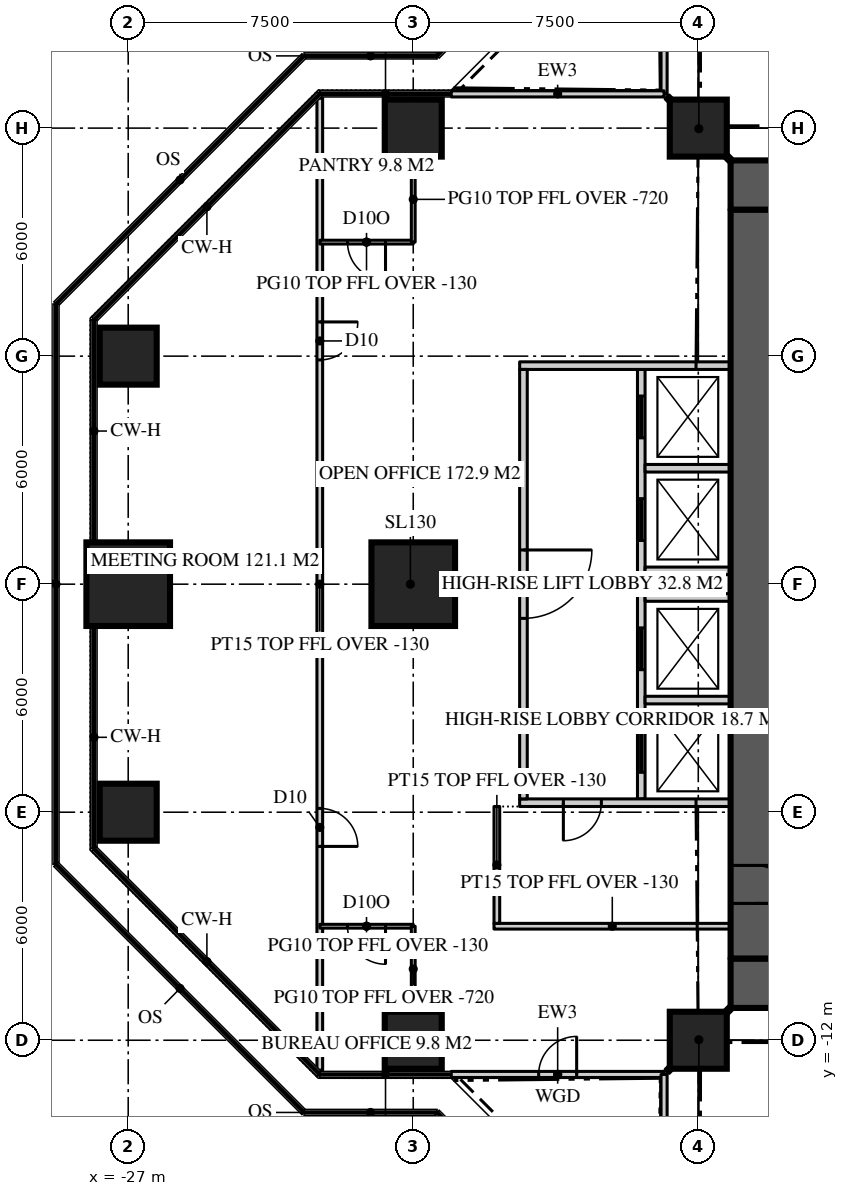
"""IFC4 building model, lengths in metres.
Left out: names, types, materials, properties, quantities, classifications, styles, units other than length and angle.
Written with IfcOpenShell. Run it as: python <this file> out.ifc"""

import sys

from ifc_helpers import new_model, si_unit, direction, frame, frame_2d, origin, origin_2d, place, context, subcontext, project, spatial, rectangle, extrude, element, fill, save


model = new_model("IFC4")
c1 = context("Model", 3, precision=1e-05, world=origin(), true_north=direction((0.0, 1.0)))
c2 = subcontext(c1, "Body", "Model", "MODEL_VIEW")
j1 = project(units=[si_unit("LENGTHUNIT", "METRE"), si_unit("PLANEANGLEUNIT", "RADIAN")], contexts=[c1])
p1 = place(None, origin())
s1 = spatial("IfcSite", under=j1, at=p1, CompositionType="ELEMENT")
p2 = place(p1, origin())
s2 = spatial("IfcBuilding", under=s1, at=p2, CompositionType="ELEMENT")
p3 = place(p2, frame((0.0, 0.0, 243.9)))
s3 = spatial("IfcBuildingStorey", under=s2, at=p3, CompositionType="ELEMENT", Elevation=243.9)
p4 = place(p3, frame((-11.15, 10.5, 0.0), z_axis=(0.0, 0.0, 1.0), x_axis=(1.0, 0.0, 0.0)))
e1 = element("IfcWall", 1, at=p4, inside=s3, PredefinedType="SHEAR", context=c2, shape_type="SweptSolid", body=[
    extrude(rectangle(XDim=22.3, YDim=1.3, at=frame_2d((11.15, 0.0))), origin(), (0.0, 0.0, 1.0), 3.9),
])
p5 = place(p4, frame((4.25, 0.0, 0.0)))
e2 = element("IfcOpeningElement", 2, at=p5, cuts=e1, PredefinedType="OPENING", context=c2, shape_type="SweptSolid", body=[
    extrude(rectangle(XDim=1.8, YDim=2.2, at=frame_2d((0.9, 1.1))), frame((0.0, 0.66, 0.0), z_axis=(0.0, -1.0, 0.0), x_axis=(1.0, 0.0, 0.0)), (0.0, 0.0, 1.0), 1.32),
])
p6 = place(p4, frame((16.25, 0.0, 0.0)))
e3 = element("IfcOpeningElement", 3, at=p6, cuts=e1, PredefinedType="OPENING", context=c2, shape_type="SweptSolid", body=[
    extrude(rectangle(XDim=1.8, YDim=2.2, at=frame_2d((0.9, 1.1))), frame((0.0, 0.66, 0.0), z_axis=(0.0, -1.0, 0.0), x_axis=(1.0, 0.0, 0.0)), (0.0, 0.0, 1.0), 1.32),
])
p7 = place(p3, frame((11.15, -10.5, 0.0), z_axis=(0.0, 0.0, 1.0), x_axis=(-1.0, 0.0, 0.0)))
e4 = element("IfcWall", 4, at=p7, inside=s3, PredefinedType="SHEAR", context=c2, shape_type="SweptSolid", body=[
    extrude(rectangle(XDim=22.3, YDim=1.3, at=frame_2d((11.15, 0.0))), origin(), (0.0, 0.0, 1.0), 3.9),
])
p8 = place(p7, frame((16.25, 0.0, 0.0)))
e5 = element("IfcOpeningElement", 5, at=p8, cuts=e4, PredefinedType="OPENING", context=c2, shape_type="SweptSolid", body=[
    extrude(rectangle(XDim=1.8, YDim=2.2, at=frame_2d((0.9, 1.1))), frame((0.0, 0.66, 0.0), z_axis=(0.0, -1.0, 0.0), x_axis=(1.0, 0.0, 0.0)), (0.0, 0.0, 1.0), 1.32),
])
p9 = place(p7, frame((4.25, 0.0, 0.0)))
e6 = element("IfcOpeningElement", 6, at=p9, cuts=e4, PredefinedType="OPENING", context=c2, shape_type="SweptSolid", body=[
    extrude(rectangle(XDim=1.8, YDim=2.2, at=frame_2d((0.9, 1.1))), frame((0.0, 0.66, 0.0), z_axis=(0.0, -1.0, 0.0), x_axis=(1.0, 0.0, 0.0)), (0.0, 0.0, 1.0), 1.32),
])
p10 = place(p3, frame((-10.5, 9.85, 0.0), z_axis=(0.0, 0.0, 1.0), x_axis=(0.0, -1.0, 0.0)))
e7 = element("IfcWall", 7, at=p10, inside=s3, PredefinedType="SHEAR", context=c2, shape_type="SweptSolid", body=[
    extrude(rectangle(XDim=19.7, YDim=1.3, at=frame_2d((9.85, 0.0))), origin(), (0.0, 0.0, 1.0), 3.9),
])
p11 = place(p10, frame((17.25, 0.0, 0.0)))
e8 = element("IfcOpeningElement", 8, at=p11, cuts=e7, PredefinedType="OPENING", context=c2, shape_type="SweptSolid", body=[
    extrude(rectangle(XDim=1.0, YDim=2.2, at=frame_2d((0.5, 1.1))), frame((0.0, 0.66, 0.0), z_axis=(0.0, -1.0, 0.0), x_axis=(1.0, 0.0, 0.0)), (0.0, 0.0, 1.0), 1.32),
])
for number, where, z_axis, x_axis in (
    (9, (-19.5, -12.0, 0.0), (0.0, 0.0, 1.0), (1.0, 0.0, 0.0)),
    (10, (-12.0, -12.0, 0.0), (0.0, 0.0, 1.0), (1.0, 0.0, 0.0)),
    (11, (-27.0, -6.0, 0.0), (0.0, 0.0, 1.0), (1.0, 0.0, 0.0)),
):
    element("IfcColumn", number, at=place(p3, frame(where, z_axis=z_axis, x_axis=x_axis)), inside=s3, PredefinedType="COLUMN", context=c2, shape_type="SweptSolid", body=[
        extrude(rectangle(XDim=1.5, YDim=1.5, at=origin_2d()), origin(), (0.0, 0.0, 1.0), 3.9),
    ])
for number, where, z_axis, x_axis in (
    (12, (-27.0, 0.0, 0.0), (0.0, 0.0, 1.0), (1.0, 0.0, 0.0)),
    (13, (-19.5, 0.0, 0.0), (0.0, 0.0, 1.0), (1.0, 0.0, 0.0)),
):
    element("IfcColumn", number, at=place(p3, frame(where, z_axis=z_axis, x_axis=x_axis)), inside=s3, PredefinedType="COLUMN", context=c2, shape_type="SweptSolid", body=[
        extrude(rectangle(XDim=2.2, YDim=2.2, at=origin_2d()), origin(), (0.0, 0.0, 1.0), 3.9),
    ])
for number, where, z_axis, x_axis in (
    (14, (-27.0, 6.0, 0.0), (0.0, 0.0, 1.0), (1.0, 0.0, 0.0)),
    (15, (-19.5, 12.0, 0.0), (0.0, 0.0, 1.0), (1.0, 0.0, 0.0)),
    (16, (-12.0, 12.0, 0.0), (0.0, 0.0, 1.0), (1.0, 0.0, 0.0)),
):
    element("IfcColumn", number, at=place(p3, frame(where, z_axis=z_axis, x_axis=x_axis)), inside=s3, PredefinedType="COLUMN", context=c2, shape_type="SweptSolid", body=[
        extrude(rectangle(XDim=1.5, YDim=1.5, at=origin_2d()), origin(), (0.0, 0.0, 1.0), 3.9),
    ])
p12 = place(p3, frame((-12.9, 18.5, 0.0), z_axis=(0.0, 0.0, 1.0), x_axis=(0.0, -1.0, 0.0)))
e17 = element("IfcWall", 17, at=p12, inside=s3, PredefinedType="SOLIDWALL", context=c2, shape_type="SweptSolid", body=[
    extrude(rectangle(XDim=5.6, YDim=0.16, at=frame_2d((2.8, 0.0))), origin(), (0.0, 0.0, 1.0), 3.77),
])
p13 = place(p12, frame((2.3, 0.0, 0.0)))
e18 = element("IfcOpeningElement", 18, at=p13, cuts=e17, PredefinedType="OPENING", context=c2, shape_type="SweptSolid", body=[
    extrude(rectangle(XDim=1.0, YDim=2.2, at=frame_2d((0.5, 1.1))), frame((0.0, 0.09, 0.0), z_axis=(0.0, -1.0, 0.0), x_axis=(1.0, 0.0, 0.0)), (0.0, 0.0, 1.0), 0.18),
])
p14 = place(p3, frame((-12.9, 12.9, 0.0), z_axis=(0.0, 0.0, 1.0), x_axis=(-1.0, 0.0, 0.0)))
e19 = element("IfcWall", 19, at=p14, inside=s3, PredefinedType="SOLIDWALL", context=c2, shape_type="SweptSolid", body=[
    extrude(rectangle(XDim=5.6, YDim=0.16, at=frame_2d((2.8, 0.0))), origin(), (0.0, 0.0, 1.0), 3.77),
])
p15 = place(p3, frame((-18.5, -12.9, 0.0), z_axis=(0.0, 0.0, 1.0), x_axis=(1.0, 0.0, 0.0)))
e20 = element("IfcWall", 20, at=p15, inside=s3, PredefinedType="SOLIDWALL", context=c2, shape_type="SweptSolid", body=[
    extrude(rectangle(XDim=5.6, YDim=0.16, at=frame_2d((2.8, 0.0))), origin(), (0.0, 0.0, 1.0), 3.77),
])
p16 = place(p15, frame((2.3, 0.0, 0.0)))
e21 = element("IfcOpeningElement", 21, at=p16, cuts=e20, PredefinedType="OPENING", context=c2, shape_type="SweptSolid", body=[
    extrude(rectangle(XDim=1.0, YDim=2.2, at=frame_2d((0.5, 1.1))), frame((0.0, 0.09, 0.0), z_axis=(0.0, -1.0, 0.0), x_axis=(1.0, 0.0, 0.0)), (0.0, 0.0, 1.0), 0.18),
])
p17 = place(p3, frame((-12.9, -12.9, 0.0), z_axis=(0.0, 0.0, 1.0), x_axis=(0.0, -1.0, 0.0)))
e22 = element("IfcWall", 22, at=p17, inside=s3, PredefinedType="SOLIDWALL", context=c2, shape_type="SweptSolid", body=[
    extrude(rectangle(XDim=5.6, YDim=0.16, at=frame_2d((2.8, 0.0))), origin(), (0.0, 0.0, 1.0), 3.77),
])
p18 = place(p3, frame((-21.959, 12.786, 0.0), z_axis=(0.0, 0.0, 1.0), x_axis=(0.0, -1.0, 0.0)))
e23 = element("IfcWall", 23, at=p18, inside=s3, PredefinedType="PARTITIONING", context=c2, shape_type="SweptSolid", body=[
    extrude(rectangle(XDim=25.573, YDim=0.15, at=frame_2d((12.786, 0.0))), origin(), (0.0, 0.0, 1.0), 3.77),
])
p19 = place(p18, frame((18.687, 0.0, 0.0)))
e24 = element("IfcOpeningElement", 24, at=p19, cuts=e23, PredefinedType="OPENING", context=c2, shape_type="SweptSolid", body=[
    extrude(rectangle(XDim=1.0, YDim=2.2, at=frame_2d((0.5, 1.1))), frame((0.0, 0.085, 0.0), z_axis=(0.0, -1.0, 0.0), x_axis=(1.0, 0.0, 0.0)), (0.0, 0.0, 1.0), 0.17),
])
p20 = place(p18, frame((5.886, 0.0, 0.0)))
e25 = element("IfcOpeningElement", 25, at=p20, cuts=e23, PredefinedType="OPENING", context=c2, shape_type="SweptSolid", body=[
    extrude(rectangle(XDim=1.0, YDim=2.2, at=frame_2d((0.5, 1.1))), frame((0.0, 0.085, 0.0), z_axis=(0.0, -1.0, 0.0), x_axis=(1.0, 0.0, 0.0)), (0.0, 0.0, 1.0), 0.17),
])
p21 = place(p3, frame((-19.5, -9.0, 0.0), z_axis=(0.0, 0.0, 1.0), x_axis=(-1.0, 0.0, 0.0)))
e26 = element("IfcWall", 26, at=p21, inside=s3, PredefinedType="PARTITIONING", context=c2, shape_type="SweptSolid", body=[
    extrude(rectangle(XDim=2.459, YDim=0.1, at=frame_2d((1.229, 0.0))), origin(), (0.0, 0.0, 1.0), 3.77),
])
p22 = place(p21, frame((0.729, 0.0, 0.0)))
e27 = element("IfcOpeningElement", 27, at=p22, cuts=e26, PredefinedType="OPENING", context=c2, shape_type="SweptSolid", body=[
    extrude(rectangle(XDim=1.0, YDim=2.2, at=frame_2d((0.5, 1.1))), frame((0.0, 0.06, 0.0), z_axis=(0.0, -1.0, 0.0), x_axis=(1.0, 0.0, 0.0)), (0.0, 0.0, 1.0), 0.12),
])
p23 = place(p3, frame((-19.5, -9.0, 0.0), z_axis=(0.0, 0.0, 1.0), x_axis=(0.0, -1.0, 0.0)))
e28 = element("IfcWall", 28, at=p23, inside=s3, PredefinedType="PARTITIONING", context=c2, shape_type="SweptSolid", body=[
    extrude(rectangle(XDim=2.25, YDim=0.1, at=frame_2d((1.125, 0.0))), origin(), (0.0, 0.0, 1.0), 3.18),
])
p24 = place(p3, frame((-19.5, 9.0, 0.0), z_axis=(0.0, 0.0, 1.0), x_axis=(-1.0, 0.0, 0.0)))
e29 = element("IfcWall", 29, at=p24, inside=s3, PredefinedType="PARTITIONING", context=c2, shape_type="SweptSolid", body=[
    extrude(rectangle(XDim=2.459, YDim=0.1, at=frame_2d((1.229, 0.0))), origin(), (0.0, 0.0, 1.0), 3.77),
])
p25 = place(p24, frame((0.729, 0.0, 0.0)))
e30 = element("IfcOpeningElement", 30, at=p25, cuts=e29, PredefinedType="OPENING", context=c2, shape_type="SweptSolid", body=[
    extrude(rectangle(XDim=1.0, YDim=2.2, at=frame_2d((0.5, 1.1))), frame((0.0, 0.06, 0.0), z_axis=(0.0, -1.0, 0.0), x_axis=(1.0, 0.0, 0.0)), (0.0, 0.0, 1.0), 0.12),
])
p26 = place(p3, frame((-19.5, 9.0, 0.0), z_axis=(0.0, 0.0, 1.0), x_axis=(0.0, 1.0, 0.0)))
e31 = element("IfcWall", 31, at=p26, inside=s3, PredefinedType="PARTITIONING", context=c2, shape_type="SweptSolid", body=[
    extrude(rectangle(XDim=2.25, YDim=0.1, at=frame_2d((1.125, 0.0))), origin(), (0.0, 0.0, 1.0), 3.18),
])
p27 = place(p3, frame((-13.5, 5.65, 0.0), z_axis=(0.0, 0.0, 1.0), x_axis=(0.0, -1.0, 0.0)))
e32 = element("IfcWall", 32, at=p27, inside=s3, PredefinedType="SOLIDWALL", context=c2, shape_type="SweptSolid", body=[
    extrude(rectangle(XDim=11.3, YDim=0.2, at=frame_2d((5.65, 0.0))), origin(), (0.0, 0.0, 1.0), 3.7),
])
p28 = place(p27, frame((0.7, 0.0, 0.0)))
e33 = element("IfcOpeningElement", 33, at=p28, cuts=e32, PredefinedType="OPENING", context=c2, shape_type="SweptSolid", body=[
    extrude(rectangle(XDim=1.1, YDim=2.2, at=frame_2d((0.55, 1.1))), frame((0.0, 0.11, 0.0), z_axis=(0.0, -1.0, 0.0), x_axis=(1.0, 0.0, 0.0)), (0.0, 0.0, 1.0), 0.22),
])
p29 = place(p27, frame((3.4, 0.0, 0.0)))
e34 = element("IfcOpeningElement", 34, at=p29, cuts=e32, PredefinedType="OPENING", context=c2, shape_type="SweptSolid", body=[
    extrude(rectangle(XDim=1.1, YDim=2.2, at=frame_2d((0.55, 1.1))), frame((0.0, 0.11, 0.0), z_axis=(0.0, -1.0, 0.0), x_axis=(1.0, 0.0, 0.0)), (0.0, 0.0, 1.0), 0.22),
])
p30 = place(p27, frame((6.8, 0.0, 0.0)))
e35 = element("IfcOpeningElement", 35, at=p30, cuts=e32, PredefinedType="OPENING", context=c2, shape_type="SweptSolid", body=[
    extrude(rectangle(XDim=1.1, YDim=2.2, at=frame_2d((0.55, 1.1))), frame((0.0, 0.11, 0.0), z_axis=(0.0, -1.0, 0.0), x_axis=(1.0, 0.0, 0.0)), (0.0, 0.0, 1.0), 0.22),
])
p31 = place(p27, frame((9.5, 0.0, 0.0)))
e36 = element("IfcOpeningElement", 36, at=p31, cuts=e32, PredefinedType="OPENING", context=c2, shape_type="SweptSolid", body=[
    extrude(rectangle(XDim=1.1, YDim=2.2, at=frame_2d((0.55, 1.1))), frame((0.0, 0.11, 0.0), z_axis=(0.0, -1.0, 0.0), x_axis=(1.0, 0.0, 0.0)), (0.0, 0.0, 1.0), 0.22),
])
p32 = place(p3, frame((-11.15, 5.75, 0.0), z_axis=(0.0, 0.0, 1.0), x_axis=(-1.0, 0.0, 0.0)))
e37 = element("IfcWall", 37, at=p32, inside=s3, PredefinedType="SOLIDWALL", context=c2, shape_type="SweptSolid", body=[
    extrude(rectangle(XDim=5.55, YDim=0.2, at=frame_2d((2.775, 0.0))), origin(), (0.0, 0.0, 1.0), 3.7),
])
p33 = place(p3, frame((-11.15, -5.75, 0.0), z_axis=(0.0, 0.0, 1.0), x_axis=(-1.0, 0.0, 0.0)))
e38 = element("IfcWall", 38, at=p33, inside=s3, PredefinedType="SOLIDWALL", context=c2, shape_type="SweptSolid", body=[
    extrude(rectangle(XDim=5.55, YDim=0.2, at=frame_2d((2.775, 0.0))), origin(), (0.0, 0.0, 1.0), 3.7),
])
p34 = place(p33, frame((3.4, 0.0, 0.0)))
e39 = element("IfcOpeningElement", 39, at=p34, cuts=e38, PredefinedType="OPENING", context=c2, shape_type="SweptSolid", body=[
    extrude(rectangle(XDim=1.0, YDim=2.2, at=frame_2d((0.5, 1.1))), frame((0.0, 0.11, 0.0), z_axis=(0.0, -1.0, 0.0), x_axis=(1.0, 0.0, 0.0)), (0.0, 0.0, 1.0), 0.22),
])
for number, where, z_axis, x_axis in (
    (40, (-11.15, 3.05, 0.0), (0.0, 0.0, 1.0), (-1.0, 0.0, 0.0)),
    (41, (-11.15, 0.35, 0.0), (0.0, 0.0, 1.0), (-1.0, 0.0, 0.0)),
    (42, (-11.15, -0.35, 0.0), (0.0, 0.0, 1.0), (-1.0, 0.0, 0.0)),
    (43, (-11.15, -3.05, 0.0), (0.0, 0.0, 1.0), (-1.0, 0.0, 0.0)),
):
    element("IfcWall", number, at=place(p3, frame(where, z_axis=z_axis, x_axis=x_axis)), inside=s3, PredefinedType="SOLIDWALL", context=c2, shape_type="SweptSolid", body=[
        extrude(rectangle(XDim=2.25, YDim=0.2, at=frame_2d((1.125, 0.0))), origin(), (0.0, 0.0, 1.0), 3.7),
    ])
p35 = place(p3, frame((-16.6, 5.65, 0.0), z_axis=(0.0, 0.0, 1.0), x_axis=(0.0, -1.0, 0.0)))
e44 = element("IfcWall", 44, at=p35, inside=s3, PredefinedType="SOLIDWALL", context=c2, shape_type="SweptSolid", body=[
    extrude(rectangle(XDim=11.3, YDim=0.2, at=frame_2d((5.65, 0.0))), origin(), (0.0, 0.0, 1.0), 3.18),
])
p36 = place(p35, frame((4.75, 0.0, 0.0)))
e45 = element("IfcOpeningElement", 45, at=p36, cuts=e44, PredefinedType="OPENING", context=c2, shape_type="SweptSolid", body=[
    extrude(rectangle(XDim=1.8, YDim=2.2, at=frame_2d((0.9, 1.1))), frame((0.0, 0.11, 0.0), z_axis=(0.0, -1.0, 0.0), x_axis=(1.0, 0.0, 0.0)), (0.0, 0.0, 1.0), 0.22),
])
for number, where, z_axis, x_axis in (
    (46, (-11.15, 11.15, 0.0), (0.0, 0.0, 1.0), (-0.707, 0.707, 0.0)),
    (47, (-11.15, -11.15, 0.0), (0.0, 0.0, 1.0), (-0.707, -0.707, 0.0)),
):
    element("IfcWall", number, at=place(p3, frame(where, z_axis=z_axis, x_axis=x_axis)), inside=s3, PredefinedType="PARTITIONING", context=c2, shape_type="SweptSolid", body=[
        extrude(rectangle(XDim=2.362, YDim=0.15, at=frame_2d((1.181, 0.0))), origin(), (0.0, 0.0, 1.0), 3.22),
    ])
p37 = place(p3, frame((-11.15, -9.0, 0.0), z_axis=(0.0, 0.0, 1.0), x_axis=(-1.0, 0.0, 0.0)))
e48 = element("IfcWall", 48, at=p37, inside=s3, PredefinedType="PARTITIONING", context=c2, shape_type="SweptSolid", body=[
    extrude(rectangle(XDim=6.225, YDim=0.15, at=frame_2d((3.113, 0.0))), origin(), (0.0, 0.0, 1.0), 3.77),
])
p38 = place(p3, frame((-17.3, -5.85, 0.0), z_axis=(0.0, 0.0, 1.0), x_axis=(0.0, -1.0, 0.0)))
e49 = element("IfcWall", 49, at=p38, inside=s3, PredefinedType="PARTITIONING", context=c2, shape_type="SweptSolid", body=[
    extrude(rectangle(XDim=3.075, YDim=0.15, at=frame_2d((1.538, 0.0))), origin(), (0.0, 0.0, 1.0), 3.77),
])
p39 = place(p16, origin())
e50 = element("IfcDoor", 50, at=p39, inside=s3, OperationType="SINGLE_SWING_RIGHT", PredefinedType="DOOR", context=c2, shape_type="SweptSolid", body=[
    extrude(rectangle(XDim=1.0, YDim=2.2, at=frame_2d((0.5, 1.1))), frame((0.0, 0.025, 0.0), z_axis=(0.0, -1.0, 0.0), x_axis=(1.0, 0.0, 0.0)), (0.0, 0.0, 1.0), 0.05),
])
fill(e21, e50)
p40 = place(p11, origin())
e51 = element("IfcDoor", 51, at=p40, inside=s3, OperationType="SINGLE_SWING_RIGHT", PredefinedType="DOOR", context=c2, shape_type="SweptSolid", body=[
    extrude(rectangle(XDim=1.0, YDim=2.2, at=frame_2d((0.5, 1.1))), frame((0.0, 0.025, 0.0), z_axis=(0.0, -1.0, 0.0), x_axis=(1.0, 0.0, 0.0)), (0.0, 0.0, 1.0), 0.05),
])
fill(e8, e51)
p41 = place(p19, origin())
e52 = element("IfcDoor", 52, at=p41, inside=s3, OperationType="SINGLE_SWING_RIGHT", PredefinedType="DOOR", context=c2, shape_type="SweptSolid", body=[
    extrude(rectangle(XDim=1.0, YDim=2.2, at=frame_2d((0.5, 1.1))), frame((0.0, 0.025, 0.0), z_axis=(0.0, -1.0, 0.0), x_axis=(1.0, 0.0, 0.0)), (0.0, 0.0, 1.0), 0.05),
])
fill(e24, e52)
p42 = place(p20, origin())
e53 = element("IfcDoor", 53, at=p42, inside=s3, OperationType="SINGLE_SWING_LEFT", PredefinedType="DOOR", context=c2, shape_type="SweptSolid", body=[
    extrude(rectangle(XDim=1.0, YDim=2.2, at=frame_2d((0.5, 1.1))), frame((0.0, 0.025, 0.0), z_axis=(0.0, -1.0, 0.0), x_axis=(1.0, 0.0, 0.0)), (0.0, 0.0, 1.0), 0.05),
])
fill(e25, e53)
p43 = place(p22, origin())
e54 = element("IfcDoor", 54, at=p43, inside=s3, OperationType="SINGLE_SWING_LEFT", PredefinedType="DOOR", context=c2, shape_type="SweptSolid", body=[
    extrude(rectangle(XDim=1.0, YDim=2.2, at=frame_2d((0.5, 1.1))), frame((0.0, 0.025, 0.0), z_axis=(0.0, -1.0, 0.0), x_axis=(1.0, 0.0, 0.0)), (0.0, 0.0, 1.0), 0.05),
])
fill(e27, e54)
p44 = place(p25, origin())
e55 = element("IfcDoor", 55, at=p44, inside=s3, OperationType="SINGLE_SWING_LEFT", PredefinedType="DOOR", context=c2, shape_type="SweptSolid", body=[
    extrude(rectangle(XDim=1.0, YDim=2.2, at=frame_2d((0.5, 1.1))), frame((0.0, 0.025, 0.0), z_axis=(0.0, -1.0, 0.0), x_axis=(1.0, 0.0, 0.0)), (0.0, 0.0, 1.0), 0.05),
])
fill(e30, e55)
p45 = place(p36, origin())
e56 = element("IfcDoor", 56, at=p45, inside=s3, OperationType="DOUBLE_DOOR_DOUBLE_SWING", PredefinedType="DOOR", context=c2, shape_type="SweptSolid", body=[
    extrude(rectangle(XDim=1.8, YDim=2.2, at=frame_2d((0.9, 1.1))), frame((0.0, 0.025, 0.0), z_axis=(0.0, -1.0, 0.0), x_axis=(1.0, 0.0, 0.0)), (0.0, 0.0, 1.0), 0.05),
])
fill(e45, e56)
p46 = place(p28, origin())
e57 = element("IfcDoor", 57, at=p46, inside=s3, OperationType="SLIDING_TO_LEFT", PredefinedType="DOOR", context=c2, shape_type="SweptSolid", body=[
    extrude(rectangle(XDim=1.1, YDim=2.2, at=frame_2d((0.55, 1.1))), frame((0.0, 0.025, 0.0), z_axis=(0.0, -1.0, 0.0), x_axis=(1.0, 0.0, 0.0)), (0.0, 0.0, 1.0), 0.05),
])
fill(e33, e57)
p47 = place(p29, origin())
e58 = element("IfcDoor", 58, at=p47, inside=s3, OperationType="SLIDING_TO_LEFT", PredefinedType="DOOR", context=c2, shape_type="SweptSolid", body=[
    extrude(rectangle(XDim=1.1, YDim=2.2, at=frame_2d((0.55, 1.1))), frame((0.0, 0.025, 0.0), z_axis=(0.0, -1.0, 0.0), x_axis=(1.0, 0.0, 0.0)), (0.0, 0.0, 1.0), 0.05),
])
fill(e34, e58)
p48 = place(p30, origin())
e59 = element("IfcDoor", 59, at=p48, inside=s3, OperationType="SLIDING_TO_LEFT", PredefinedType="DOOR", context=c2, shape_type="SweptSolid", body=[
    extrude(rectangle(XDim=1.1, YDim=2.2, at=frame_2d((0.55, 1.1))), frame((0.0, 0.025, 0.0), z_axis=(0.0, -1.0, 0.0), x_axis=(1.0, 0.0, 0.0)), (0.0, 0.0, 1.0), 0.05),
])
fill(e35, e59)
p49 = place(p31, origin())
e60 = element("IfcDoor", 60, at=p49, inside=s3, OperationType="SLIDING_TO_LEFT", PredefinedType="DOOR", context=c2, shape_type="SweptSolid", body=[
    extrude(rectangle(XDim=1.1, YDim=2.2, at=frame_2d((0.55, 1.1))), frame((0.0, 0.025, 0.0), z_axis=(0.0, -1.0, 0.0), x_axis=(1.0, 0.0, 0.0)), (0.0, 0.0, 1.0), 0.05),
])
fill(e36, e60)
p50 = place(p34, origin())
e61 = element("IfcDoor", 61, at=p50, inside=s3, OperationType="SINGLE_SWING_RIGHT", PredefinedType="DOOR", context=c2, shape_type="SweptSolid", body=[
    extrude(rectangle(XDim=1.0, YDim=2.2, at=frame_2d((0.5, 1.1))), frame((0.0, 0.025, 0.0), z_axis=(0.0, -1.0, 0.0), x_axis=(1.0, 0.0, 0.0)), (0.0, 0.0, 1.0), 0.05),
])
fill(e39, e61)
save(model, sys.argv[1])
